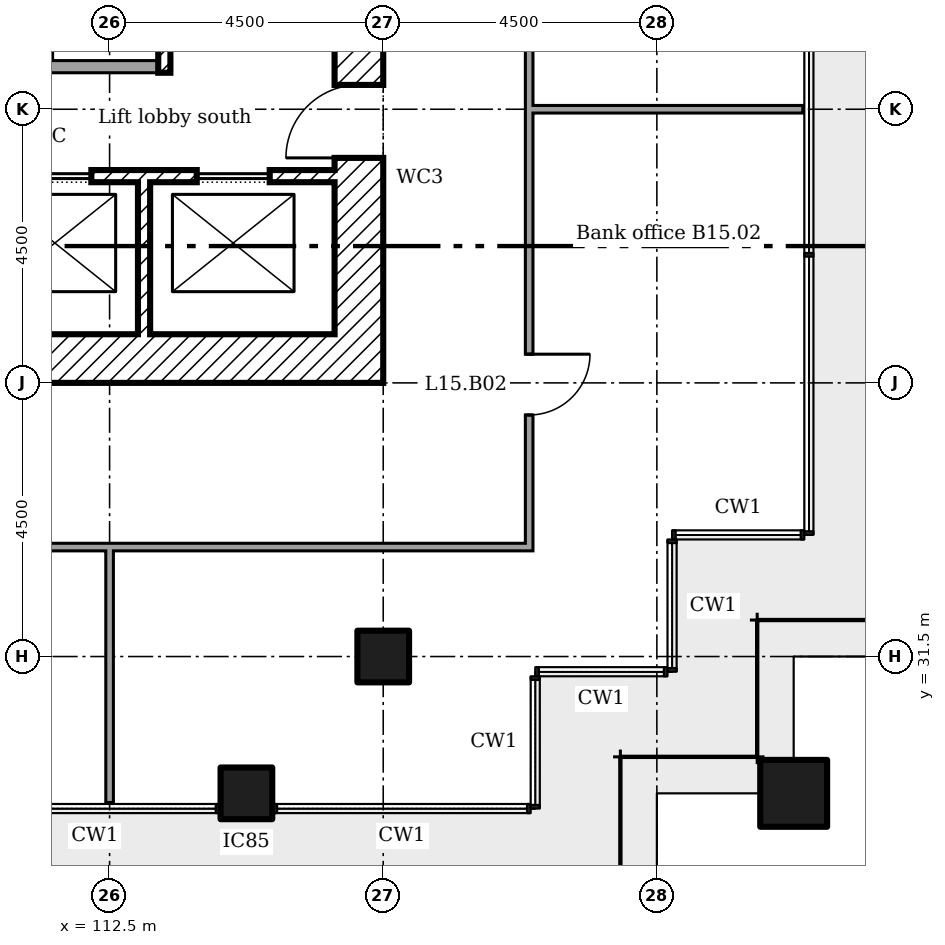
"""IFC4 building model, lengths in metres.
Left out: names, types, materials, properties, quantities, classifications, styles, units other than length and angle.
Written with IfcOpenShell. Run it as: python <this file> out.ifc"""

import sys

from ifc_helpers import new_model, si_unit, direction, frame, frame_2d, origin, origin_2d, place, context, subcontext, project, spatial, rectangle, extrude, element, fill, save


model = new_model("IFC4")
c1 = context("Model", 3, precision=1e-05, world=origin(), true_north=direction((0.0, 1.0)))
c2 = subcontext(c1, "Body", "Model", "MODEL_VIEW")
j1 = project(units=[si_unit("LENGTHUNIT", "METRE"), si_unit("PLANEANGLEUNIT", "RADIAN")], contexts=[c1])
p1 = place(None, origin())
s1 = spatial("IfcSite", under=j1, at=p1, CompositionType="ELEMENT")
p2 = place(p1, origin())
s2 = spatial("IfcBuilding", under=s1, at=p2, CompositionType="ELEMENT")
p3 = place(p2, frame((0.0, 0.0, 65.4)))
s3 = spatial("IfcBuildingStorey", under=s2, at=p3, CompositionType="ELEMENT", Elevation=65.4)
p4 = place(p3, frame((123.75, 29.25, 0.0)))
e1 = element("IfcColumn", 1, at=p4, inside=s3, PredefinedType="COLUMN", context=c2, shape_type="SweptSolid", body=[
    extrude(rectangle(XDim=1.1, YDim=1.1, at=origin_2d()), origin(), (0.0, 0.0, 1.0), 3.6),
])
for number, where in (
    (2, (114.75, 29.25, 0.0)),
    (3, (117.0, 31.5, 0.0)),
):
    element("IfcColumn", number, at=place(p3, frame(where)), inside=s3, PredefinedType="COLUMN", context=c2, shape_type="SweptSolid", body=[
        extrude(rectangle(XDim=0.85, YDim=0.85, at=origin_2d()), origin(), (0.0, 0.0, 1.0), 3.6),
    ])
p5 = place(p3, frame((116.6, 36.0, 0.0), z_axis=(0.0, 0.0, 1.0), x_axis=(0.0, 1.0, 0.0)))
e4 = element("IfcWall", 4, at=p5, inside=s3, PredefinedType="SHEAR", context=c2, shape_type="SweptSolid", body=[
    extrude(rectangle(XDim=13.5, YDim=0.8, at=frame_2d((6.75, 0.0))), origin(), (0.0, 0.0, 1.0), 3.35),
])
p6 = place(p5, frame((3.7, 0.0, 0.0)))
e5 = element("IfcOpeningElement", 5, at=p6, cuts=e4, PredefinedType="OPENING", context=c2, shape_type="SweptSolid", body=[
    extrude(rectangle(XDim=1.2, YDim=2.1, at=frame_2d((0.6, 1.05))), frame((0.0, 0.41, 0.0), z_axis=(0.0, -1.0, 0.0), x_axis=(1.0, 0.0, 0.0)), (0.0, 0.0, 1.0), 0.82),
])
p7 = place(p5, frame((6.275, 0.0, 0.0)))
e6 = element("IfcOpeningElement", 6, at=p7, cuts=e4, PredefinedType="OPENING", context=c2, shape_type="SweptSolid", body=[
    extrude(rectangle(XDim=1.0, YDim=2.1, at=frame_2d((0.5, 1.05))), frame((0.0, 0.41, 0.0), z_axis=(0.0, -1.0, 0.0), x_axis=(1.0, 0.0, 0.0)), (0.0, 0.0, 1.0), 0.82),
])
p8 = place(p3, frame((104.3, 36.4, 0.0)))
e7 = element("IfcWall", 7, at=p8, inside=s3, PredefinedType="SHEAR", context=c2, shape_type="SweptSolid", body=[
    extrude(rectangle(XDim=11.9, YDim=0.8, at=frame_2d((5.95, 0.0))), origin(), (0.0, 0.0, 1.0), 3.35),
])
p9 = place(p3, frame((113.067, 36.8, 0.0), z_axis=(0.0, 0.0, 1.0), x_axis=(0.0, 1.0, 0.0)))
e8 = element("IfcWall", 8, at=p9, inside=s3, PredefinedType="SHEAR", context=c2, shape_type="SweptSolid", body=[
    extrude(rectangle(XDim=2.5, YDim=0.2, at=frame_2d((1.25, 0.0))), origin(), (0.0, 0.0, 1.0), 3.35),
])
p10 = place(p3, frame((107.2, 39.4, 0.0)))
e9 = element("IfcWall", 9, at=p10, inside=s3, PredefinedType="SHEAR", context=c2, shape_type="SweptSolid", body=[
    extrude(rectangle(XDim=9.0, YDim=0.2, at=frame_2d((4.5, 0.0))), origin(), (0.0, 0.0, 1.0), 3.35),
])
p11 = place(p10, frame((0.867, 0.0, 0.0)))
e10 = element("IfcOpeningElement", 10, at=p11, cuts=e9, PredefinedType="OPENING", context=c2, shape_type="SweptSolid", body=[
    extrude(rectangle(XDim=1.2, YDim=2.1, at=frame_2d((0.6, 1.05))), frame((0.0, 0.11, 0.0), z_axis=(0.0, -1.0, 0.0), x_axis=(1.0, 0.0, 0.0)), (0.0, 0.0, 1.0), 0.22),
])
p12 = place(p10, frame((3.8, 0.0, 0.0)))
e11 = element("IfcOpeningElement", 11, at=p12, cuts=e9, PredefinedType="OPENING", context=c2, shape_type="SweptSolid", body=[
    extrude(rectangle(XDim=1.2, YDim=2.1, at=frame_2d((0.6, 1.05))), frame((0.0, 0.11, 0.0), z_axis=(0.0, -1.0, 0.0), x_axis=(1.0, 0.0, 0.0)), (0.0, 0.0, 1.0), 0.22),
])
p13 = place(p10, frame((6.733, 0.0, 0.0)))
e12 = element("IfcOpeningElement", 12, at=p13, cuts=e9, PredefinedType="OPENING", context=c2, shape_type="SweptSolid", body=[
    extrude(rectangle(XDim=1.2, YDim=2.1, at=frame_2d((0.6, 1.05))), frame((0.0, 0.11, 0.0), z_axis=(0.0, -1.0, 0.0), x_axis=(1.0, 0.0, 0.0)), (0.0, 0.0, 1.0), 0.22),
])
p14 = place(p3, frame((113.4, 41.1, 0.0), z_axis=(0.0, 0.0, 1.0), x_axis=(0.0, 1.0, 0.0)))
e13 = element("IfcWall", 13, at=p14, inside=s3, PredefinedType="SHEAR", context=c2, shape_type="SweptSolid", body=[
    extrude(rectangle(XDim=7.6, YDim=0.2, at=frame_2d((3.8, 0.0))), origin(), (0.0, 0.0, 1.0), 3.35),
])
p15 = place(p3, frame((107.2, 41.2, 0.0)))
e14 = element("IfcWall", 14, at=p15, inside=s3, PredefinedType="PARTITIONING", context=c2, shape_type="SweptSolid", body=[
    extrude(rectangle(XDim=6.1, YDim=0.2, at=frame_2d((3.05, 0.0))), origin(), (0.0, 0.0, 1.0), 3.35),
])
p16 = place(p15, frame((0.8, 0.0, 0.0)))
e15 = element("IfcOpeningElement", 15, at=p16, cuts=e14, PredefinedType="OPENING", context=c2, shape_type="SweptSolid", body=[
    extrude(rectangle(XDim=0.9, YDim=2.1, at=frame_2d((0.45, 1.05))), frame((0.0, 0.11, 0.0), z_axis=(0.0, -1.0, 0.0), x_axis=(1.0, 0.0, 0.0)), (0.0, 0.0, 1.0), 0.22),
])
p17 = place(p15, frame((2.95, 0.0, 0.0)))
e16 = element("IfcOpeningElement", 16, at=p17, cuts=e14, PredefinedType="OPENING", context=c2, shape_type="SweptSolid", body=[
    extrude(rectangle(XDim=0.9, YDim=2.1, at=frame_2d((0.45, 1.05))), frame((0.0, 0.11, 0.0), z_axis=(0.0, -1.0, 0.0), x_axis=(1.0, 0.0, 0.0)), (0.0, 0.0, 1.0), 0.22),
])
p18 = place(p3, frame((100.137, 33.3, 0.0)))
e17 = element("IfcWall", 17, at=p18, inside=s3, PredefinedType="PARTITIONING", context=c2, shape_type="SweptSolid", body=[
    extrude(rectangle(XDim=19.325, YDim=0.125, at=frame_2d((9.663, 0.0))), origin(), (0.0, 0.0, 1.0), 3.45),
])
p19 = place(p3, frame((119.4, 40.5, 0.0)))
e18 = element("IfcWall", 18, at=p19, inside=s3, PredefinedType="PARTITIONING", context=c2, shape_type="SweptSolid", body=[
    extrude(rectangle(XDim=4.5, YDim=0.125, at=frame_2d((2.25, 0.0))), origin(), (0.0, 0.0, 1.0), 2.851),
])
p20 = place(p3, frame((112.5, 29.1, 0.0), z_axis=(0.0, 0.0, 1.0), x_axis=(0.0, 1.0, 0.0)))
e19 = element("IfcWall", 19, at=p20, inside=s3, PredefinedType="PARTITIONING", context=c2, shape_type="SweptSolid", body=[
    extrude(rectangle(XDim=4.2, YDim=0.125, at=frame_2d((2.1, 0.0))), origin(), (0.0, 0.0, 1.0), 2.851),
])
p21 = place(p3, frame((119.4, 33.363, 0.0), z_axis=(0.0, 0.0, 1.0), x_axis=(0.0, 1.0, 0.0)))
e20 = element("IfcWall", 20, at=p21, inside=s3, PredefinedType="PARTITIONING", context=c2, shape_type="SweptSolid", body=[
    extrude(rectangle(XDim=17.875, YDim=0.125, at=frame_2d((8.938, 0.0))), origin(), (0.0, 0.0, 1.0), 3.45),
])
p22 = place(p21, frame((2.11, 0.0, 0.0)))
e21 = element("IfcOpeningElement", 21, at=p22, cuts=e20, PredefinedType="OPENING", context=c2, shape_type="SweptSolid", body=[
    extrude(rectangle(XDim=1.0, YDim=2.1, at=frame_2d((0.5, 1.05))), frame((0.0, 0.073, 0.0), z_axis=(0.0, -1.0, 0.0), x_axis=(1.0, 0.0, 0.0)), (0.0, 0.0, 1.0), 0.145),
])
p23 = place(p21, frame((9.343, 0.0, 0.0)))
e22 = element("IfcOpeningElement", 22, at=p23, cuts=e20, PredefinedType="OPENING", context=c2, shape_type="SweptSolid", body=[
    extrude(rectangle(XDim=1.0, YDim=2.1, at=frame_2d((0.5, 1.05))), frame((0.0, 0.073, 0.0), z_axis=(0.0, -1.0, 0.0), x_axis=(1.0, 0.0, 0.0)), (0.0, 0.0, 1.0), 0.145),
])
p24 = place(p21, frame((14.288, 0.0, 0.0)))
e23 = element("IfcOpeningElement", 23, at=p24, cuts=e20, PredefinedType="OPENING", context=c2, shape_type="SweptSolid", body=[
    extrude(rectangle(XDim=1.0, YDim=2.1, at=frame_2d((0.5, 1.05))), frame((0.0, 0.073, 0.0), z_axis=(0.0, -1.0, 0.0), x_axis=(1.0, 0.0, 0.0)), (0.0, 0.0, 1.0), 0.145),
])
p25 = place(p6, origin())
e24 = element("IfcDoor", 24, at=p25, inside=s3, OperationType="SINGLE_SWING_RIGHT", PredefinedType="DOOR", context=c2, shape_type="SweptSolid", body=[
    extrude(rectangle(XDim=1.2, YDim=2.1, at=frame_2d((0.6, 1.05))), frame((0.0, 0.025, 0.0), z_axis=(0.0, -1.0, 0.0), x_axis=(1.0, 0.0, 0.0)), (0.0, 0.0, 1.0), 0.05),
])
fill(e5, e24)
p26 = place(p12, origin())
e25 = element("IfcDoor", 25, at=p26, inside=s3, OperationType="SLIDING_TO_LEFT", PredefinedType="DOOR", context=c2, shape_type="SweptSolid", body=[
    extrude(rectangle(XDim=1.2, YDim=2.1, at=frame_2d((0.6, 1.05))), frame((0.0, 0.025, 0.0), z_axis=(0.0, -1.0, 0.0), x_axis=(1.0, 0.0, 0.0)), (0.0, 0.0, 1.0), 0.05),
])
fill(e11, e25)
p27 = place(p13, origin())
e26 = element("IfcDoor", 26, at=p27, inside=s3, OperationType="SLIDING_TO_LEFT", PredefinedType="DOOR", context=c2, shape_type="SweptSolid", body=[
    extrude(rectangle(XDim=1.2, YDim=2.1, at=frame_2d((0.6, 1.05))), frame((0.0, 0.025, 0.0), z_axis=(0.0, -1.0, 0.0), x_axis=(1.0, 0.0, 0.0)), (0.0, 0.0, 1.0), 0.05),
])
fill(e12, e26)
p28 = place(p22, frame((1.0, 0.0, 0.0), x_axis=(-1.0, 0.0, 0.0)))
e27 = element("IfcDoor", 27, at=p28, inside=s3, OperationType="SINGLE_SWING_RIGHT", PredefinedType="DOOR", context=c2, shape_type="SweptSolid", body=[
    extrude(rectangle(XDim=1.0, YDim=2.1, at=frame_2d((0.5, 1.05))), frame((0.0, 0.025, 0.0), z_axis=(0.0, -1.0, 0.0), x_axis=(1.0, 0.0, 0.0)), (0.0, 0.0, 1.0), 0.05),
])
fill(e21, e27)
save(model, sys.argv[1])
